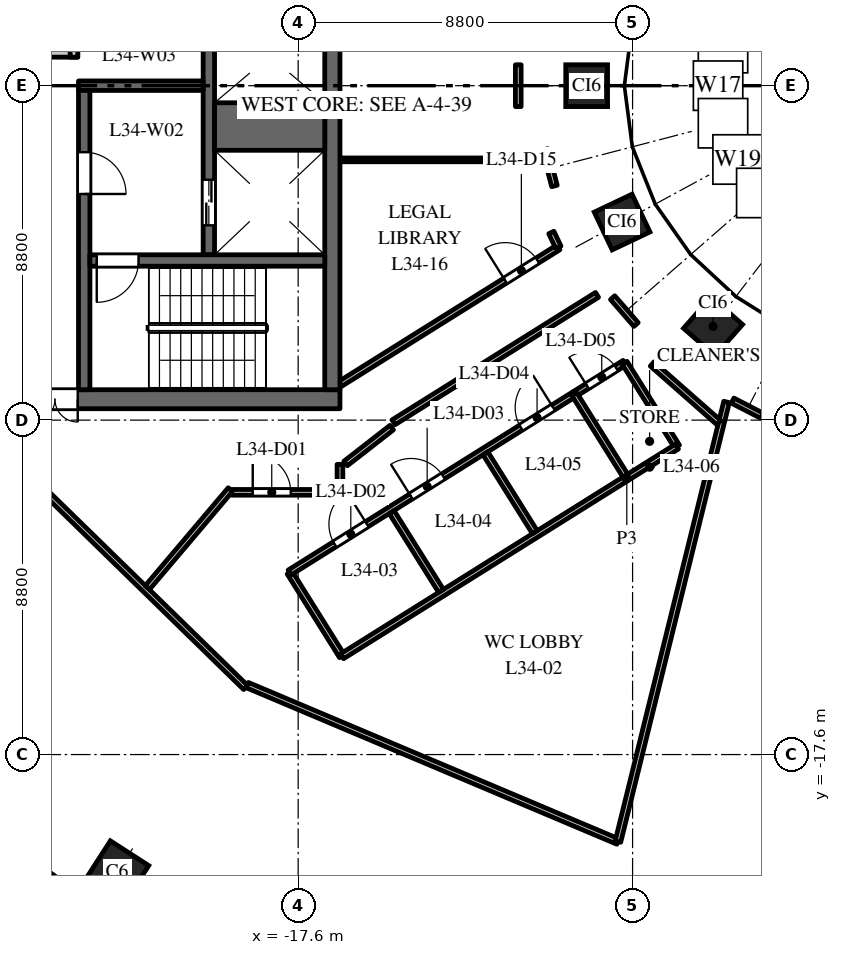
"""IFC4 building model, lengths in metres.
Left out: names, types, materials, properties, quantities, classifications, styles, units other than length and angle.
Written with IfcOpenShell. Run it as: python <this file> out.ifc"""

import sys

from ifc_helpers import new_model, si_unit, direction, frame, frame_2d, origin, origin_2d, place, context, subcontext, project, spatial, rectangle, extrude, element, fill, save


model = new_model("IFC4")
c1 = context("Model", 3, precision=1e-05, world=origin(), true_north=direction((0.0, 1.0)))
c2 = subcontext(c1, "Body", "Model", "MODEL_VIEW")
j1 = project(units=[si_unit("LENGTHUNIT", "METRE"), si_unit("PLANEANGLEUNIT", "RADIAN")], contexts=[c1])
p1 = place(None, origin())
s1 = spatial("IfcSite", under=j1, at=p1, CompositionType="ELEMENT")
p2 = place(p1, origin())
s2 = spatial("IfcBuilding", under=s1, at=p2, CompositionType="ELEMENT")
p3 = place(p2, frame((0.0, 0.0, 150.0)))
s3 = spatial("IfcBuildingStorey", under=s2, at=p3, CompositionType="ELEMENT", Elevation=150.0)
p4 = place(p3, frame((-22.362, -20.7, 0.0), z_axis=(0.0, 0.0, 1.0), x_axis=(0.840247639643, -0.542202825586, 0.0)))
e1 = element("IfcColumn", 1, at=p4, inside=s3, PredefinedType="COLUMN", context=c2, shape_type="SweptSolid", body=[
    extrude(rectangle(XDim=1.2, YDim=1.2, at=origin_2d()), origin(), (0.0, 0.0, 1.0), 4.0),
])
for number, where, z_axis, x_axis in (
    (2, (-10.008, 0.0, 0.0), (0.0, 0.0, 1.0), (0.0, -1.0, 0.0)),
    (3, (-9.076, -3.588, 0.0), (0.0, 0.0, 1.0), (0.429, -0.903, 0.0)),
    (4, (-6.682, -6.334, 0.0), (0.0, 0.0, 1.0), (0.751, -0.66, 0.0)),
):
    element("IfcColumn", number, at=place(p3, frame(where, z_axis=z_axis, x_axis=x_axis)), inside=s3, PredefinedType="COLUMN", context=c2, shape_type="SweptSolid", body=[
        extrude(rectangle(XDim=1.1, YDim=1.1, at=origin_2d()), origin(), (0.0, 0.0, 1.0), 4.0),
    ])
p5 = place(p3, frame((-16.5, -8.25, 0.0), z_axis=(0.0, 0.0, 1.0), x_axis=(-1.0, 0.0, 0.0)))
e5 = element("IfcWall", 5, at=p5, inside=s3, PredefinedType="SHEAR", context=c2, shape_type="SweptSolid", body=[
    extrude(rectangle(XDim=15.0, YDim=0.5, at=frame_2d((7.5, 0.0))), origin(), (0.0, 0.0, 1.0), 3.7),
])
p6 = place(p5, frame((6.9, 0.0, 0.0)))
e6 = element("IfcOpeningElement", 6, at=p6, cuts=e5, PredefinedType="OPENING", context=c2, shape_type="SweptSolid", body=[
    extrude(rectangle(XDim=1.2, YDim=2.1, at=frame_2d((0.6, 1.05))), frame((0.0, 0.26, 0.0), z_axis=(0.0, -1.0, 0.0), x_axis=(1.0, 0.0, 0.0)), (0.0, 0.0, 1.0), 0.52),
])
p7 = place(p5, frame((12.275, 0.0, 0.0)))
e7 = element("IfcOpeningElement", 7, at=p7, cuts=e5, PredefinedType="OPENING", context=c2, shape_type="SweptSolid", body=[
    extrude(rectangle(XDim=0.9, YDim=2.1, at=frame_2d((0.45, 1.05))), frame((0.0, 0.26, 0.0), z_axis=(0.0, -1.0, 0.0), x_axis=(1.0, 0.0, 0.0)), (0.0, 0.0, 1.0), 0.52),
])
p8 = place(p3, frame((-19.95, -4.45, 0.0), z_axis=(0.0, 0.0, 1.0), x_axis=(0.0, 1.0, 0.0)))
e8 = element("IfcWall", 8, at=p8, inside=s3, PredefinedType="SHEAR", context=c2, shape_type="SweptSolid", body=[
    extrude(rectangle(XDim=8.9, YDim=0.3, at=frame_2d((4.45, 0.0))), origin(), (0.0, 0.0, 1.0), 3.7),
])
p9 = place(p8, frame((0.775, 0.0, 0.0)))
e9 = element("IfcOpeningElement", 9, at=p9, cuts=e8, PredefinedType="OPENING", context=c2, shape_type="SweptSolid", body=[
    extrude(rectangle(XDim=1.2, YDim=2.1, at=frame_2d((0.6, 1.05))), frame((0.0, 0.16, 0.0), z_axis=(0.0, -1.0, 0.0), x_axis=(1.0, 0.0, 0.0)), (0.0, 0.0, 1.0), 0.32),
])
p10 = place(p8, frame((7.25, 0.0, 0.0)))
e10 = element("IfcOpeningElement", 10, at=p10, cuts=e8, PredefinedType="OPENING", context=c2, shape_type="SweptSolid", body=[
    extrude(rectangle(XDim=1.1, YDim=2.1, at=frame_2d((0.55, 1.05))), frame((0.0, 0.16, 0.0), z_axis=(0.0, -1.0, 0.0), x_axis=(1.0, 0.0, 0.0)), (0.0, 0.0, 1.0), 0.32),
])
p11 = place(p3, frame((-20.1, 0.0, 0.0), z_axis=(0.0, 0.0, 1.0), x_axis=(-1.0, 0.0, 0.0)))
e11 = element("IfcWall", 11, at=p11, inside=s3, PredefinedType="SHEAR", context=c2, shape_type="SweptSolid", body=[
    extrude(rectangle(XDim=3.28, YDim=0.25, at=frame_2d((1.64, 0.0))), origin(), (0.0, 0.0, 1.0), 3.7),
])
p12 = place(p3, frame((-16.7, -8.0, 0.0), z_axis=(0.0, 0.0, 1.0), x_axis=(0.0, 1.0, 0.0)))
e12 = element("IfcWall", 12, at=p12, inside=s3, PredefinedType="SHEAR", context=c2, shape_type="SweptSolid", body=[
    extrude(rectangle(XDim=16.0, YDim=0.4, at=frame_2d((8.0, 0.0))), origin(), (0.0, 0.0, 1.0), 3.7),
])
p13 = place(p3, frame((-23.4, 0.85, 0.0), z_axis=(0.0, 0.0, 1.0), x_axis=(-1.0, 0.0, 0.0)))
e13 = element("IfcWall", 13, at=p13, inside=s3, PredefinedType="PARTITIONING", context=c2, shape_type="SweptSolid", body=[
    extrude(rectangle(XDim=1.2, YDim=0.2, at=frame_2d((0.6, 0.0))), origin(), (0.0, 0.0, 1.0), 3.7),
])
p14 = place(p3, frame((-23.5, 0.75, 0.0), z_axis=(0.0, 0.0, 1.0), x_axis=(0.0, 1.0, 0.0)))
e14 = element("IfcWall", 14, at=p14, inside=s3, PredefinedType="PARTITIONING", context=c2, shape_type="SweptSolid", body=[
    extrude(rectangle(XDim=1.6, YDim=0.2, at=frame_2d((0.8, 0.0))), origin(), (0.0, 0.0, 1.0), 3.7),
])
p15 = place(p14, frame((0.25, 0.0, 0.0)))
e15 = element("IfcOpeningElement", 15, at=p15, cuts=e14, PredefinedType="OPENING", context=c2, shape_type="SweptSolid", body=[
    extrude(rectangle(XDim=0.9, YDim=2.1, at=frame_2d((0.45, 1.05))), frame((0.0, 0.11, 0.0), z_axis=(0.0, -1.0, 0.0), x_axis=(1.0, 0.0, 0.0)), (0.0, 0.0, 1.0), 0.22),
])
p16 = place(p3, frame((-16.9, -1.075, 0.0), z_axis=(0.0, 0.0, 1.0), x_axis=(-1.0, 0.0, 0.0)))
e16 = element("IfcWall", 16, at=p16, inside=s3, PredefinedType="SHEAR", context=c2, shape_type="SweptSolid", body=[
    extrude(rectangle(XDim=2.9, YDim=1.25, at=frame_2d((1.45, 0.0))), origin(), (0.0, 0.0, 1.0), 3.7),
])
p17 = place(p3, frame((-23.23, -8.0, 0.0), z_axis=(0.0, 0.0, 1.0), x_axis=(0.0, 1.0, 0.0)))
e17 = element("IfcWall", 17, at=p17, inside=s3, PredefinedType="SHEAR", context=c2, shape_type="SweptSolid", body=[
    extrude(rectangle(XDim=7.875, YDim=0.3, at=frame_2d((3.938, 0.0))), origin(), (0.0, 0.0, 1.0), 3.7),
])
p18 = place(p17, frame((5.15, 0.0, 0.0)))
e18 = element("IfcOpeningElement", 18, at=p18, cuts=e17, PredefinedType="OPENING", context=c2, shape_type="SweptSolid", body=[
    extrude(rectangle(XDim=1.1, YDim=2.1, at=frame_2d((0.55, 1.05))), frame((0.0, 0.16, 0.0), z_axis=(0.0, -1.0, 0.0), x_axis=(1.0, 0.0, 0.0)), (0.0, 0.0, 1.0), 0.32),
])
p19 = place(p3, frame((-16.9, -4.6, 0.0), z_axis=(0.0, 0.0, 1.0), x_axis=(-1.0, 0.0, 0.0)))
e19 = element("IfcWall", 19, at=p19, inside=s3, PredefinedType="SHEAR", context=c2, shape_type="SweptSolid", body=[
    extrude(rectangle(XDim=6.18, YDim=0.3, at=frame_2d((3.09, 0.0))), origin(), (0.0, 0.0, 1.0), 3.7),
])
p20 = place(p19, frame((4.9, 0.0, 0.0)))
e20 = element("IfcOpeningElement", 20, at=p20, cuts=e19, PredefinedType="OPENING", context=c2, shape_type="SweptSolid", body=[
    extrude(rectangle(XDim=1.1, YDim=2.1, at=frame_2d((0.55, 1.05))), frame((0.0, 0.16, 0.0), z_axis=(0.0, -1.0, 0.0), x_axis=(1.0, 0.0, 0.0)), (0.0, 0.0, 1.0), 0.32),
])
p21 = place(p3, frame((-24.166, -10.778, 0.0), z_axis=(0.0, 0.0, 1.0), x_axis=(0.715834142481, -0.698270349119, 0.0)))
e21 = element("IfcWall", 21, at=p21, inside=s3, PredefinedType="PARTITIONING", context=c2, shape_type="SweptSolid", body=[
    extrude(rectangle(XDim=7.242, YDim=0.15, at=frame_2d((3.621, 0.0))), origin(), (0.0, 0.0, 1.0), 2.75),
])
p22 = place(p3, frame((-21.568, -13.207, 0.0), z_axis=(0.0, 0.0, 1.0), x_axis=(0.646414818584, 0.762986161287, 0.0)))
e22 = element("IfcWall", 22, at=p22, inside=s3, PredefinedType="PARTITIONING", context=c2, shape_type="SweptSolid", body=[
    extrude(rectangle(XDim=3.38, YDim=0.15, at=frame_2d((1.69, 0.0))), origin(), (0.0, 0.0, 1.0), 3.7),
])
p23 = place(p3, frame((-19.347, -10.7, 0.0), z_axis=(0.0, 0.0, 1.0), x_axis=(1.0, 0.0, 0.0)))
e23 = element("IfcWall", 23, at=p23, inside=s3, PredefinedType="PARTITIONING", context=c2, shape_type="SweptSolid", body=[
    extrude(rectangle(XDim=2.847, YDim=0.15, at=frame_2d((1.423, 0.0))), origin(), (0.0, 0.0, 1.0), 3.7),
])
p24 = place(p23, frame((0.552, 0.0, 0.0)))
e24 = element("IfcOpeningElement", 24, at=p24, cuts=e23, PredefinedType="OPENING", context=c2, shape_type="SweptSolid", body=[
    extrude(rectangle(XDim=1.0, YDim=2.1, at=frame_2d((0.5, 1.05))), frame((0.0, 0.085, 0.0), z_axis=(0.0, -1.0, 0.0), x_axis=(1.0, 0.0, 0.0)), (0.0, 0.0, 1.0), 0.17),
])
p25 = place(p3, frame((-18.94, -15.771, 0.0), z_axis=(0.0, 0.0, 1.0), x_axis=(0.921243869672, -0.3889855172, 0.0)))
e25 = element("IfcWall", 25, at=p25, inside=s3, PredefinedType="PARTITIONING", context=c2, shape_type="SweptSolid", body=[
    extrude(rectangle(XDim=10.589, YDim=0.15, at=frame_2d((5.294, 0.0))), origin(), (0.0, 0.0, 1.0), 2.85),
])
p26 = place(p3, frame((-17.825, -12.81, 0.0), z_axis=(0.0, 0.0, 1.0), x_axis=(0.530649529914, -0.847591338088, 0.0)))
e26 = element("IfcWall", 26, at=p26, inside=s3, PredefinedType="PARTITIONING", context=c2, shape_type="SweptSolid", body=[
    extrude(rectangle(XDim=2.597, YDim=0.15, at=frame_2d((1.298, 0.0))), origin(), (0.0, 0.0, 1.0), 3.7),
])
p27 = place(p3, frame((-17.825, -12.81, 0.0), z_axis=(0.0, 0.0, 1.0), x_axis=(0.847586900006, 0.53065661867, 0.0)))
e27 = element("IfcWall", 27, at=p27, inside=s3, PredefinedType="PARTITIONING", context=c2, shape_type="SweptSolid", body=[
    extrude(rectangle(XDim=8.84, YDim=0.15, at=frame_2d((4.42, 0.0))), origin(), (0.0, 0.0, 1.0), 3.7),
])
p28 = place(p27, frame((1.4, 0.0, 0.0)))
e28 = element("IfcOpeningElement", 28, at=p28, cuts=e27, PredefinedType="OPENING", context=c2, shape_type="SweptSolid", body=[
    extrude(rectangle(XDim=1.0, YDim=2.1, at=frame_2d((0.5, 1.05))), frame((0.0, 0.085, 0.0), z_axis=(0.0, -1.0, 0.0), x_axis=(1.0, 0.0, 0.0)), (0.0, 0.0, 1.0), 0.17),
])
p29 = place(p27, frame((3.77, 0.0, 0.0)))
e29 = element("IfcOpeningElement", 29, at=p29, cuts=e27, PredefinedType="OPENING", context=c2, shape_type="SweptSolid", body=[
    extrude(rectangle(XDim=1.0, YDim=2.1, at=frame_2d((0.5, 1.05))), frame((0.0, 0.085, 0.0), z_axis=(0.0, -1.0, 0.0), x_axis=(1.0, 0.0, 0.0)), (0.0, 0.0, 1.0), 0.17),
])
p30 = place(p27, frame((7.182, 0.0, 0.0)))
e30 = element("IfcOpeningElement", 30, at=p30, cuts=e27, PredefinedType="OPENING", context=c2, shape_type="SweptSolid", body=[
    extrude(rectangle(XDim=1.0, YDim=2.1, at=frame_2d((0.5, 1.05))), frame((0.0, 0.085, 0.0), z_axis=(0.0, -1.0, 0.0), x_axis=(1.0, 0.0, 0.0)), (0.0, 0.0, 1.0), 0.17),
])
p31 = place(p3, frame((-16.5, -10.7, 0.0), z_axis=(0.0, 0.0, 1.0), x_axis=(0.0, 1.0, 0.0)))
e31 = element("IfcWall", 31, at=p31, inside=s3, PredefinedType="PARTITIONING", context=c2, shape_type="SweptSolid", body=[
    extrude(rectangle(XDim=0.736, YDim=0.15, at=frame_2d((0.368, 0.0))), origin(), (0.0, 0.0, 1.0), 3.7),
])
p32 = place(p3, frame((-16.5, -1.952, 0.0), z_axis=(0.0, 0.0, 1.0), x_axis=(1.0, 0.0, 0.0)))
e32 = element("IfcWall", 32, at=p32, inside=s3, PredefinedType="PARTITIONING", context=c2, shape_type="SweptSolid", body=[
    extrude(rectangle(XDim=5.384, YDim=0.1, at=frame_2d((2.692, 0.0))), origin(), (0.0, 0.0, 1.0), 3.7),
])
p33 = place(p3, frame((-16.445, -15.014, 0.0), z_axis=(0.0, 0.0, 1.0), x_axis=(0.847607097418, 0.530624357155, 0.0)))
e33 = element("IfcWall", 33, at=p33, inside=s3, PredefinedType="PARTITIONING", context=c2, shape_type="SweptSolid", body=[
    extrude(rectangle(XDim=8.84, YDim=0.15, at=frame_2d((4.42, 0.0))), origin(), (0.0, 0.0, 1.0), 3.7),
])
p34 = place(p3, frame((-16.5, -7.851, 0.0), z_axis=(0.0, 0.0, 1.0), x_axis=(0.847690706888, 0.530490777917, 0.0)))
e34 = element("IfcWall", 34, at=p34, inside=s3, PredefinedType="PARTITIONING", context=c2, shape_type="SweptSolid", body=[
    extrude(rectangle(XDim=6.781, YDim=0.15, at=frame_2d((3.39, 0.0))), origin(), (0.0, 0.0, 1.0), 3.7),
])
p35 = place(p34, frame((5.131, 0.0, 0.0)))
e35 = element("IfcOpeningElement", 35, at=p35, cuts=e34, PredefinedType="OPENING", context=c2, shape_type="SweptSolid", body=[
    extrude(rectangle(XDim=1.0, YDim=2.1, at=frame_2d((0.5, 1.05))), frame((0.0, 0.085, 0.0), z_axis=(0.0, -1.0, 0.0), x_axis=(1.0, 0.0, 0.0)), (0.0, 0.0, 1.0), 0.17),
])
p36 = place(p3, frame((-15.14, -11.219, 0.0), z_axis=(0.0, 0.0, 1.0), x_axis=(0.530868062721, -0.847454482544, 0.0)))
e36 = element("IfcWall", 36, at=p36, inside=s3, PredefinedType="PARTITIONING", context=c2, shape_type="SweptSolid", body=[
    extrude(rectangle(XDim=2.448, YDim=0.15, at=frame_2d((1.224, 0.0))), origin(), (0.0, 0.0, 1.0), 3.7),
])
p37 = place(p3, frame((-15.089, -8.856, 0.0), z_axis=(0.0, 0.0, 1.0), x_axis=(0.847611500167, 0.53061732424, 0.0)))
e37 = element("IfcWall", 37, at=p37, inside=s3, PredefinedType="PARTITIONING", context=c2, shape_type="SweptSolid", body=[
    extrude(rectangle(XDim=6.315, YDim=0.15, at=frame_2d((3.158, 0.0))), origin(), (0.0, 0.0, 1.0), 3.7),
])
p38 = place(p3, frame((-12.672, -9.673, 0.0), z_axis=(0.0, 0.0, 1.0), x_axis=(0.530760275021, -0.847521994086, 0.0)))
e38 = element("IfcWall", 38, at=p38, inside=s3, PredefinedType="PARTITIONING", context=c2, shape_type="SweptSolid", body=[
    extrude(rectangle(XDim=2.449, YDim=0.15, at=frame_2d((1.225, 0.0))), origin(), (0.0, 0.0, 1.0), 3.7),
])
p39 = place(p3, frame((-11.808, -0.55, 0.0), z_axis=(0.0, 0.0, 1.0), x_axis=(0.0, 1.0, 0.0)))
e39 = element("IfcWall", 39, at=p39, inside=s3, PredefinedType="PARTITIONING", context=c2, shape_type="SweptSolid", body=[
    extrude(rectangle(XDim=1.1, YDim=0.15, at=frame_2d((0.55, 0.0))), origin(), (0.0, 0.0, 1.0), 3.7),
])
p40 = place(p3, frame((-11.106, -1.677, 0.0), z_axis=(0.0, 0.0, 1.0), x_axis=(0.251541813796, -0.967846431988, 0.0)))
e40 = element("IfcWall", 40, at=p40, inside=s3, PredefinedType="PARTITIONING", context=c2, shape_type="SweptSolid", body=[
    extrude(rectangle(XDim=0.994, YDim=0.15, at=frame_2d((0.497, 0.0))), origin(), (0.0, 0.0, 1.0), 3.7),
])
p41 = place(p3, frame((-10.938, -3.863, 0.0), z_axis=(0.0, 0.0, 1.0), x_axis=(0.429758433873, -0.90294390109, 0.0)))
e41 = element("IfcWall", 41, at=p41, inside=s3, PredefinedType="PARTITIONING", context=c2, shape_type="SweptSolid", body=[
    extrude(rectangle(XDim=0.433, YDim=0.15, at=frame_2d((0.216, 0.0))), origin(), (0.0, 0.0, 1.0), 3.7),
])
p42 = place(p3, frame((-10.332, -8.119, 0.0), z_axis=(0.0, 0.0, 1.0), x_axis=(0.847813537923, 0.530294451144, 0.0)))
e42 = element("IfcWall", 42, at=p42, inside=s3, PredefinedType="PARTITIONING", context=c2, shape_type="SweptSolid", body=[
    extrude(rectangle(XDim=1.559, YDim=0.15, at=frame_2d((0.78, 0.0))), origin(), (0.0, 0.0, 1.0), 3.7),
])
p43 = place(p42, frame((0.4, 0.0, 0.0)))
e43 = element("IfcOpeningElement", 43, at=p43, cuts=e42, PredefinedType="OPENING", context=c2, shape_type="SweptSolid", body=[
    extrude(rectangle(XDim=0.9, YDim=2.1, at=frame_2d((0.45, 1.05))), frame((0.0, 0.085, 0.0), z_axis=(0.0, -1.0, 0.0), x_axis=(1.0, 0.0, 0.0)), (0.0, 0.0, 1.0), 0.17),
])
p44 = place(p3, frame((-10.332, -8.119, 0.0), z_axis=(0.0, 0.0, 1.0), x_axis=(0.530707606875, -0.847554975211, 0.0)))
e44 = element("IfcWall", 44, at=p44, inside=s3, PredefinedType="PARTITIONING", context=c2, shape_type="SweptSolid", body=[
    extrude(rectangle(XDim=2.601, YDim=0.15, at=frame_2d((1.3, 0.0))), origin(), (0.0, 0.0, 1.0), 3.7),
])
p45 = place(p3, frame((-9.325, -5.577, 0.0), z_axis=(0.0, 0.0, 1.0), x_axis=(0.656365478363, -0.754443078578, 0.0)))
e45 = element("IfcWall", 45, at=p45, inside=s3, PredefinedType="PARTITIONING", context=c2, shape_type="SweptSolid", body=[
    extrude(rectangle(XDim=0.938, YDim=0.15, at=frame_2d((0.469, 0.0))), origin(), (0.0, 0.0, 1.0), 2.75),
])
p46 = place(p3, frame((-9.185, -19.89, 0.0), z_axis=(0.0, 0.0, 1.0), x_axis=(0.239863913553, 0.970806521906, 0.0)))
e46 = element("IfcWall", 46, at=p46, inside=s3, PredefinedType="PARTITIONING", context=c2, shape_type="SweptSolid", body=[
    extrude(rectangle(XDim=11.916, YDim=0.15, at=frame_2d((5.958, 0.0))), origin(), (0.0, 0.0, 1.0), 3.7),
])
p47 = place(p3, frame((-9.01, -7.292, 0.0), z_axis=(0.0, 0.0, 1.0), x_axis=(0.530876561716, -0.847449158487, 0.0)))
e47 = element("IfcWall", 47, at=p47, inside=s3, PredefinedType="PARTITIONING", context=c2, shape_type="SweptSolid", body=[
    extrude(rectangle(XDim=2.6, YDim=0.15, at=frame_2d((1.3, 0.0))), origin(), (0.0, 0.0, 1.0), 2.85),
])
p48 = place(p3, frame((-8.952, -10.323, 0.0), z_axis=(0.0, 0.0, 1.0), x_axis=(0.847522002386, 0.530760261768, 0.0)))
e48 = element("IfcWall", 48, at=p48, inside=s3, PredefinedType="PARTITIONING", context=c2, shape_type="SweptSolid", body=[
    extrude(rectangle(XDim=1.556, YDim=0.15, at=frame_2d((0.778, 0.0))), origin(), (0.0, 0.0, 1.0), 2.85),
])
p49 = place(p3, frame((-8.284, -7.322, 0.0), z_axis=(0.0, 0.0, 1.0), x_axis=(0.750605726473, -0.660750363894, 0.0)))
e49 = element("IfcWall", 49, at=p49, inside=s3, PredefinedType="PARTITIONING", context=c2, shape_type="SweptSolid", body=[
    extrude(rectangle(XDim=2.337, YDim=0.15, at=frame_2d((1.168, 0.0))), origin(), (0.0, 0.0, 1.0), 2.85),
])
p50 = place(p3, frame((-6.168, -8.287, 0.0), z_axis=(0.0, 0.0, 1.0), x_axis=(0.889307410814, -0.45730988298, 0.0)))
e50 = element("IfcWall", 50, at=p50, inside=s3, PredefinedType="PARTITIONING", context=c2, shape_type="SweptSolid", body=[
    extrude(rectangle(XDim=0.868, YDim=0.15, at=frame_2d((0.434, 0.0))), origin(), (0.0, 0.0, 1.0), 3.7),
])
p51 = place(p3, frame((-15.139, -8.997, 0.0), z_axis=(0.0, 0.0, 1.0), x_axis=(-0.788950226826, -0.614457109643, 0.0)))
e51 = element("IfcWall", 51, at=p51, inside=s3, PredefinedType="PARTITIONING", context=c2, shape_type="SweptSolid", body=[
    extrude(rectangle(XDim=1.538, YDim=0.15, at=frame_2d((0.769, 0.0))), origin(), (0.0, 0.0, 1.0), 3.7),
])
p52 = place(p9, origin())
e52 = element("IfcDoor", 52, at=p52, inside=s3, OperationType="DOUBLE_DOOR_SLIDING", PredefinedType="DOOR", context=c2, shape_type="SweptSolid", body=[
    extrude(rectangle(XDim=1.2, YDim=2.1, at=frame_2d((0.6, 1.05))), frame((0.0, 0.025, 0.0), z_axis=(0.0, -1.0, 0.0), x_axis=(1.0, 0.0, 0.0)), (0.0, 0.0, 1.0), 0.05),
])
fill(e9, e52)
p53 = place(p20, origin())
e53 = element("IfcDoor", 53, at=p53, inside=s3, OperationType="SINGLE_SWING_LEFT", PredefinedType="DOOR", context=c2, shape_type="SweptSolid", body=[
    extrude(rectangle(XDim=1.1, YDim=2.1, at=frame_2d((0.55, 1.05))), frame((0.0, 0.025, 0.0), z_axis=(0.0, -1.0, 0.0), x_axis=(1.0, 0.0, 0.0)), (0.0, 0.0, 1.0), 0.05),
])
fill(e20, e53)
p54 = place(p18, origin())
e54 = element("IfcDoor", 54, at=p54, inside=s3, OperationType="SINGLE_SWING_LEFT", PredefinedType="DOOR", context=c2, shape_type="SweptSolid", body=[
    extrude(rectangle(XDim=1.1, YDim=2.1, at=frame_2d((0.55, 1.05))), frame((0.0, 0.025, 0.0), z_axis=(0.0, -1.0, 0.0), x_axis=(1.0, 0.0, 0.0)), (0.0, 0.0, 1.0), 0.05),
])
fill(e18, e54)
p55 = place(p6, origin())
e55 = element("IfcDoor", 55, at=p55, inside=s3, OperationType="DOUBLE_DOOR_DOUBLE_SWING", PredefinedType="DOOR", context=c2, shape_type="SweptSolid", body=[
    extrude(rectangle(XDim=1.2, YDim=2.1, at=frame_2d((0.6, 1.05))), frame((0.0, 0.025, 0.0), z_axis=(0.0, -1.0, 0.0), x_axis=(1.0, 0.0, 0.0)), (0.0, 0.0, 1.0), 0.05),
])
fill(e6, e55)
p56 = place(p24, origin())
e56 = element("IfcDoor", 56, at=p56, inside=s3, OperationType="SINGLE_SWING_LEFT", PredefinedType="DOOR", context=c2, shape_type="SweptSolid", body=[
    extrude(rectangle(XDim=1.0, YDim=2.1, at=frame_2d((0.5, 1.05))), frame((0.0, 0.025, 0.0), z_axis=(0.0, -1.0, 0.0), x_axis=(1.0, 0.0, 0.0)), (0.0, 0.0, 1.0), 0.05),
])
fill(e24, e56)
p57 = place(p28, origin())
e57 = element("IfcDoor", 57, at=p57, inside=s3, OperationType="SINGLE_SWING_RIGHT", PredefinedType="DOOR", context=c2, shape_type="SweptSolid", body=[
    extrude(rectangle(XDim=1.0, YDim=2.1, at=frame_2d((0.5, 1.05))), frame((0.0, 0.025, 0.0), z_axis=(0.0, -1.0, 0.0), x_axis=(1.0, 0.0, 0.0)), (0.0, 0.0, 1.0), 0.05),
])
fill(e28, e57)
p58 = place(p29, origin())
e58 = element("IfcDoor", 58, at=p58, inside=s3, OperationType="SINGLE_SWING_LEFT", PredefinedType="DOOR", context=c2, shape_type="SweptSolid", body=[
    extrude(rectangle(XDim=1.0, YDim=2.1, at=frame_2d((0.5, 1.05))), frame((0.0, 0.025, 0.0), z_axis=(0.0, -1.0, 0.0), x_axis=(1.0, 0.0, 0.0)), (0.0, 0.0, 1.0), 0.05),
])
fill(e29, e58)
p59 = place(p30, origin())
e59 = element("IfcDoor", 59, at=p59, inside=s3, OperationType="SINGLE_SWING_RIGHT", PredefinedType="DOOR", context=c2, shape_type="SweptSolid", body=[
    extrude(rectangle(XDim=1.0, YDim=2.1, at=frame_2d((0.5, 1.05))), frame((0.0, 0.025, 0.0), z_axis=(0.0, -1.0, 0.0), x_axis=(1.0, 0.0, 0.0)), (0.0, 0.0, 1.0), 0.05),
])
fill(e30, e59)
p60 = place(p43, origin())
e60 = element("IfcDoor", 60, at=p60, inside=s3, OperationType="SINGLE_SWING_LEFT", PredefinedType="DOOR", context=c2, shape_type="SweptSolid", body=[
    extrude(rectangle(XDim=0.9, YDim=2.1, at=frame_2d((0.45, 1.05))), frame((0.0, 0.025, 0.0), z_axis=(0.0, -1.0, 0.0), x_axis=(1.0, 0.0, 0.0)), (0.0, 0.0, 1.0), 0.05),
])
fill(e43, e60)
p61 = place(p35, origin())
e61 = element("IfcDoor", 61, at=p61, inside=s3, OperationType="SINGLE_SWING_LEFT", PredefinedType="DOOR", context=c2, shape_type="SweptSolid", body=[
    extrude(rectangle(XDim=1.0, YDim=2.1, at=frame_2d((0.5, 1.05))), frame((0.0, 0.025, 0.0), z_axis=(0.0, -1.0, 0.0), x_axis=(1.0, 0.0, 0.0)), (0.0, 0.0, 1.0), 0.05),
])
fill(e35, e61)
save(model, sys.argv[1])
